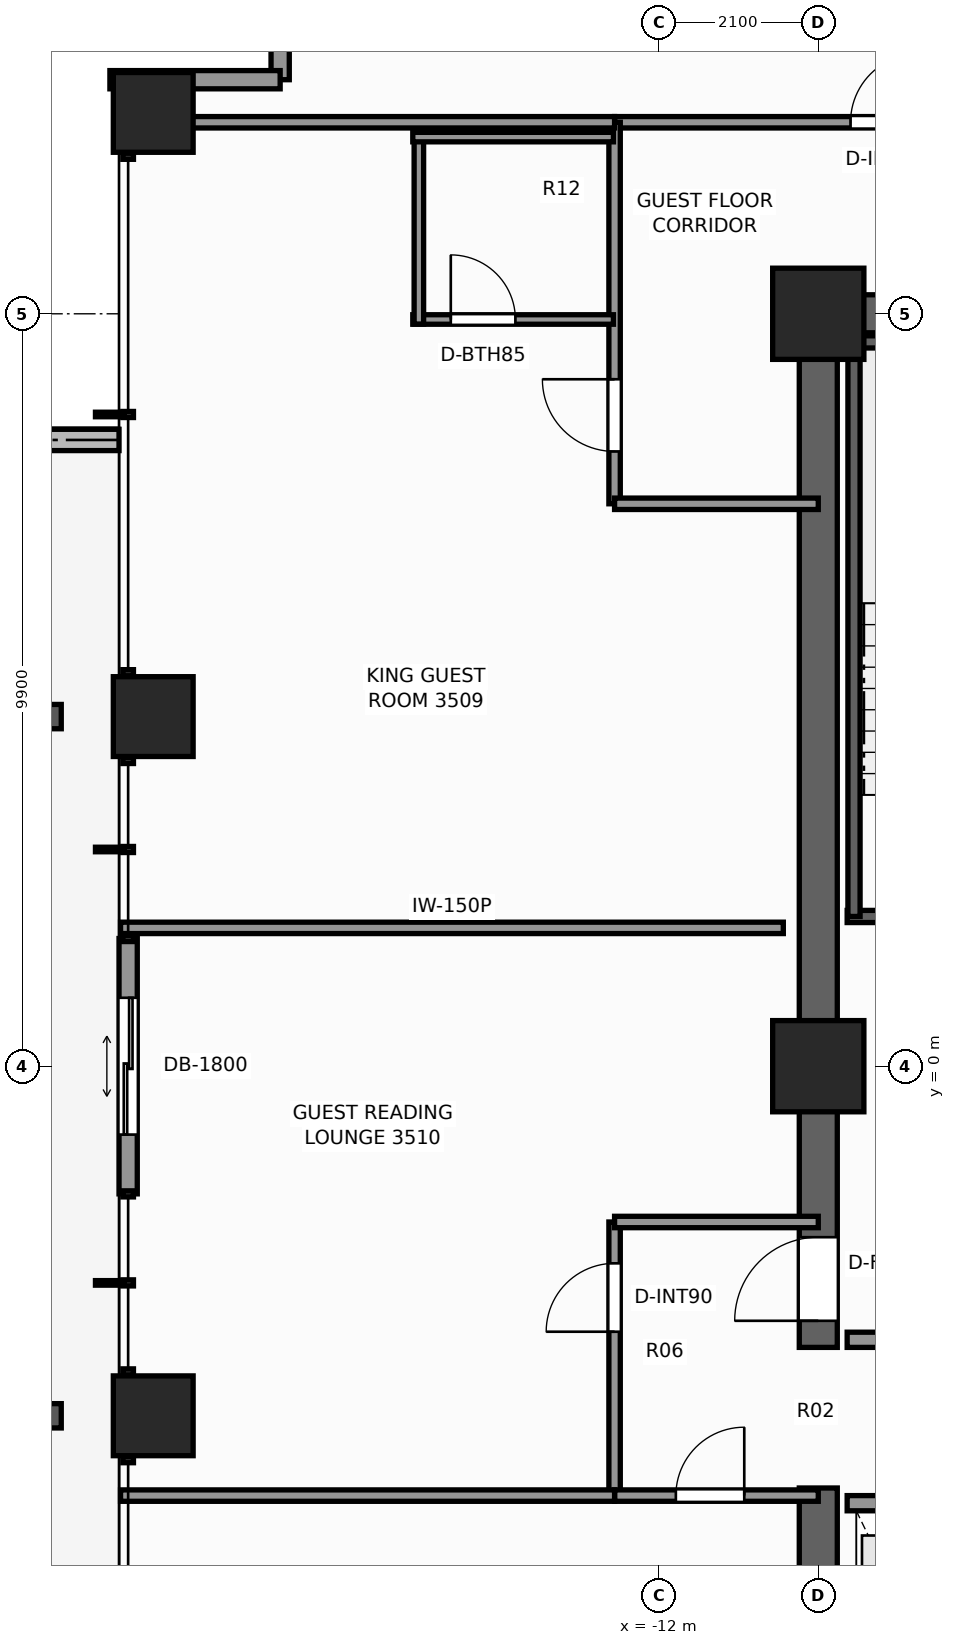
"""IFC4 building model, lengths in metres.
Left out: names, types, materials, properties, quantities, classifications, styles, units other than length and angle.
Written with IfcOpenShell. Run it as: python <this file> out.ifc"""

import sys

from ifc_helpers import new_model, si_unit, direction, frame, frame_2d, origin, origin_2d, place, context, subcontext, project, spatial, rectangle, extrude, element, fill, save


model = new_model("IFC4")
c1 = context("Model", 3, precision=1e-05, world=origin(), true_north=direction((0.0, 1.0)))
c2 = subcontext(c1, "Body", "Model", "MODEL_VIEW")
j1 = project(units=[si_unit("LENGTHUNIT", "METRE"), si_unit("PLANEANGLEUNIT", "RADIAN")], contexts=[c1])
p1 = place(None, origin())
s1 = spatial("IfcSite", under=j1, at=p1, CompositionType="ELEMENT")
p2 = place(p1, origin())
s2 = spatial("IfcBuilding", under=s1, at=p2, CompositionType="ELEMENT")
p3 = place(p2, frame((0.0, 0.0, 121.7)))
s3 = spatial("IfcBuildingStorey", under=s2, at=p3, CompositionType="ELEMENT", Elevation=121.7)
p4 = place(p3, frame((-10.15, 9.9, 0.0), z_axis=(0.0, 0.0, 1.0), x_axis=(1.0, 0.0, 0.0)))
e1 = element("IfcWall", 1, at=p4, inside=s3, PredefinedType="SHEAR", context=c2, shape_type="SweptSolid", body=[
    extrude(rectangle(XDim=14.57, YDim=0.5, at=frame_2d((7.285, 0.0))), origin(), (0.0, 0.0, 1.0), 3.3),
])
p5 = place(p3, frame((-9.9, -9.65, 0.0), z_axis=(0.0, 0.0, 1.0), x_axis=(0.0, 1.0, 0.0)))
e2 = element("IfcWall", 2, at=p5, inside=s3, PredefinedType="SHEAR", context=c2, shape_type="SweptSolid", body=[
    extrude(rectangle(XDim=4.1, YDim=0.5, at=frame_2d((2.05, 0.0))), origin(), (0.0, 0.0, 1.0), 3.3),
])
p6 = place(p3, frame((-9.9, -3.7, 0.0), z_axis=(0.0, 0.0, 1.0), x_axis=(0.0, 1.0, 0.0)))
e3 = element("IfcWall", 3, at=p6, inside=s3, PredefinedType="SHEAR", context=c2, shape_type="SweptSolid", body=[
    extrude(rectangle(XDim=13.35, YDim=0.5, at=frame_2d((6.675, 0.0))), origin(), (0.0, 0.0, 1.0), 3.3),
])
p7 = place(p6, frame((0.35, 0.0, 0.0)))
e4 = element("IfcOpeningElement", 4, at=p7, cuts=e3, PredefinedType="OPENING", context=c2, shape_type="SweptSolid", body=[
    extrude(rectangle(XDim=1.1, YDim=2.2, at=frame_2d((0.55, 1.1))), frame((0.0, 0.26, 0.0), z_axis=(0.0, -1.0, 0.0), x_axis=(1.0, 0.0, 0.0)), (0.0, 0.0, 1.0), 0.52),
])
for number, where, z_axis, x_axis in (
    (5, (-9.9, 9.9, 0.0), (0.0, 0.0, 1.0), (1.0, 0.0, 0.0)),
    (6, (-9.9, 0.0, 0.0), (0.0, 0.0, 1.0), (1.0, 0.0, 0.0)),
):
    element("IfcColumn", number, at=place(p3, frame(where, z_axis=z_axis, x_axis=x_axis)), inside=s3, PredefinedType="COLUMN", context=c2, shape_type="SweptSolid", body=[
        extrude(rectangle(XDim=1.2, YDim=1.2, at=origin_2d()), origin(), (0.0, 0.0, 1.0), 3.3),
    ])
for number, where, z_axis, x_axis in (
    (7, (-18.65, -4.6, 0.0), (0.0, 0.0, 1.0), (1.0, 0.0, 0.0)),
    (8, (-18.65, 4.6, 0.0), (0.0, 0.0, 1.0), (1.0, 0.0, 0.0)),
    (9, (-18.65, 12.55, 0.0), (0.0, 0.0, 1.0), (1.0, 0.0, 0.0)),
):
    element("IfcColumn", number, at=place(p3, frame(where, z_axis=z_axis, x_axis=x_axis)), inside=s3, PredefinedType="COLUMN", context=c2, shape_type="SweptSolid", body=[
        extrude(rectangle(XDim=1.05, YDim=1.05, at=origin_2d()), origin(), (0.0, 0.0, 1.0), 3.3),
    ])
p8 = place(p3, frame((-19.1, 8.24, -0.04), z_axis=(0.0, 0.0, 1.0), x_axis=(-1.0, 0.0, 0.0)))
e10 = element("IfcWall", 10, at=p8, inside=s3, PredefinedType="PARAPET", context=c2, shape_type="SweptSolid", body=[
    extrude(rectangle(XDim=2.006, YDim=0.28, at=frame_2d((1.003, 0.0))), origin(), (0.0, 0.0, 1.0), 0.42),
])
p9 = place(p3, frame((-16.98, 12.98, 0.0), z_axis=(0.0, 0.0, 1.0), x_axis=(0.0, 1.0, 0.0)))
e11 = element("IfcWall", 11, at=p9, inside=s3, PredefinedType="STANDARD", context=c2, shape_type="SweptSolid", body=[
    extrude(rectangle(XDim=2.24, YDim=0.24, at=frame_2d((1.12, 0.0))), origin(), (0.0, 0.0, 1.0), 2.459),
])
p10 = place(p9, frame((0.45, 0.0, 0.65)))
e12 = element("IfcOpeningElement", 12, at=p10, cuts=e11, PredefinedType="OPENING", context=c2, shape_type="SweptSolid", body=[
    extrude(rectangle(XDim=1.1, YDim=1.45, at=frame_2d((0.55, 0.725))), frame((0.0, 0.13, 0.0), z_axis=(0.0, -1.0, 0.0), x_axis=(1.0, 0.0, 0.0)), (0.0, 0.0, 1.0), 0.26),
])
p11 = place(p3, frame((-19.22, 12.98, 0.0), z_axis=(0.0, 0.0, 1.0), x_axis=(1.0, 0.0, 0.0)))
e13 = element("IfcWall", 13, at=p11, inside=s3, PredefinedType="STANDARD", context=c2, shape_type="SweptSolid", body=[
    extrude(rectangle(XDim=2.24, YDim=0.24, at=frame_2d((1.12, 0.0))), origin(), (0.0, 0.0, 1.0), 2.459),
])
p12 = place(p3, frame((-18.98, -1.68, 0.0), z_axis=(0.0, 0.0, 1.0), x_axis=(0.0, 1.0, 0.0)))
e14 = element("IfcWall", 14, at=p12, inside=s3, PredefinedType="STANDARD", context=c2, shape_type="SweptSolid", body=[
    extrude(rectangle(XDim=3.36, YDim=0.24, at=frame_2d((1.68, 0.0))), origin(), (0.0, 0.0, 1.0), 3.08),
])
p13 = place(p12, frame((0.78, 0.0, 0.0)))
e15 = element("IfcOpeningElement", 15, at=p13, cuts=e14, PredefinedType="OPENING", context=c2, shape_type="SweptSolid", body=[
    extrude(rectangle(XDim=1.8, YDim=2.2, at=frame_2d((0.9, 1.1))), frame((0.0, 0.13, 0.0), z_axis=(0.0, -1.0, 0.0), x_axis=(1.0, 0.0, 0.0)), (0.0, 0.0, 1.0), 0.26),
])
p14 = place(p3, frame((-9.52, 1.97, 0.0), z_axis=(0.0, 0.0, 1.0), x_axis=(1.0, 0.0, 0.0)))
e16 = element("IfcWall", 16, at=p14, inside=s3, PredefinedType="SHEAR", context=c2, shape_type="SweptSolid", body=[
    extrude(rectangle(XDim=3.52, YDim=0.16, at=frame_2d((1.76, 0.0))), origin(), (0.0, 0.0, 1.0), 3.3),
])
p15 = place(p14, frame((1.15, 0.0, 0.0)))
e17 = element("IfcOpeningElement", 17, at=p15, cuts=e16, PredefinedType="OPENING", context=c2, shape_type="SweptSolid", body=[
    extrude(rectangle(XDim=1.1, YDim=2.2, at=frame_2d((0.55, 1.1))), frame((0.0, 0.09, 0.0), z_axis=(0.0, -1.0, 0.0), x_axis=(1.0, 0.0, 0.0)), (0.0, 0.0, 1.0), 0.18),
])
p16 = place(p3, frame((-9.52, 9.53, 0.0), z_axis=(0.0, 0.0, 1.0), x_axis=(1.0, 0.0, 0.0)))
e18 = element("IfcWall", 18, at=p16, inside=s3, PredefinedType="SHEAR", context=c2, shape_type="SweptSolid", body=[
    extrude(rectangle(XDim=3.52, YDim=0.16, at=frame_2d((1.76, 0.0))), origin(), (0.0, 0.0, 1.0), 3.3),
])
p17 = place(p3, frame((-9.43, 1.97, 0.0), z_axis=(0.0, 0.0, 1.0), x_axis=(0.0, 1.0, 0.0)))
e19 = element("IfcWall", 19, at=p17, inside=s3, PredefinedType="SHEAR", context=c2, shape_type="SweptSolid", body=[
    extrude(rectangle(XDim=7.56, YDim=0.16, at=frame_2d((3.78, 0.0))), origin(), (0.0, 0.0, 1.0), 3.3),
])
p18 = place(p3, frame((-9.52, -3.6, 0.0), z_axis=(0.0, 0.0, 1.0), x_axis=(1.0, 0.0, 0.0)))
e20 = element("IfcWall", 20, at=p18, inside=s3, PredefinedType="SOLIDWALL", context=c2, shape_type="SweptSolid", body=[
    extrude(rectangle(XDim=3.77, YDim=0.2, at=frame_2d((1.885, 0.0))), origin(), (0.0, 0.0, 1.0), 3.08),
])
p19 = place(p18, frame((1.15, 0.0, 0.0)))
e21 = element("IfcOpeningElement", 21, at=p19, cuts=e20, PredefinedType="OPENING", context=c2, shape_type="SweptSolid", body=[
    extrude(rectangle(XDim=0.95, YDim=2.06, at=frame_2d((0.475, 1.03))), frame((0.0, 0.11, 0.0), z_axis=(0.0, -1.0, 0.0), x_axis=(1.0, 0.0, 0.0)), (0.0, 0.0, 1.0), 0.22),
])
p20 = place(p3, frame((-9.52, -5.75, 0.0), z_axis=(0.0, 0.0, 1.0), x_axis=(1.0, 0.0, 0.0)))
e22 = element("IfcWall", 22, at=p20, inside=s3, PredefinedType="SOLIDWALL", context=c2, shape_type="SweptSolid", body=[
    extrude(rectangle(XDim=5.66, YDim=0.2, at=frame_2d((2.83, 0.0))), origin(), (0.0, 0.0, 1.0), 3.08),
])
p21 = place(p20, frame((0.55, 0.0, 0.0)))
e23 = element("IfcOpeningElement", 23, at=p21, cuts=e22, PredefinedType="OPENING", context=c2, shape_type="SweptSolid", body=[
    extrude(rectangle(XDim=1.1, YDim=2.2, at=frame_2d((0.55, 1.1))), frame((0.0, 0.11, 0.0), z_axis=(0.0, -1.0, 0.0), x_axis=(1.0, 0.0, 0.0)), (0.0, 0.0, 1.0), 0.22),
])
p22 = place(p20, frame((2.48, 0.0, 0.0)))
e24 = element("IfcOpeningElement", 24, at=p22, cuts=e22, PredefinedType="OPENING", context=c2, shape_type="SweptSolid", body=[
    extrude(rectangle(XDim=1.1, YDim=2.2, at=frame_2d((0.55, 1.1))), frame((0.0, 0.11, 0.0), z_axis=(0.0, -1.0, 0.0), x_axis=(1.0, 0.0, 0.0)), (0.0, 0.0, 1.0), 0.22),
])
p23 = place(p20, frame((4.41, 0.0, 0.0)))
e25 = element("IfcOpeningElement", 25, at=p23, cuts=e22, PredefinedType="OPENING", context=c2, shape_type="SweptSolid", body=[
    extrude(rectangle(XDim=1.1, YDim=2.2, at=frame_2d((0.55, 1.1))), frame((0.0, 0.11, 0.0), z_axis=(0.0, -1.0, 0.0), x_axis=(1.0, 0.0, 0.0)), (0.0, 0.0, 1.0), 0.22),
])
p24 = place(p3, frame((-12.58, 12.42, 0.0), z_axis=(0.0, 0.0, 1.0), x_axis=(1.0, 0.0, 0.0)))
e26 = element("IfcWall", 26, at=p24, inside=s3, PredefinedType="PARTITIONING", context=c2, shape_type="SweptSolid", body=[
    extrude(rectangle(XDim=24.84, YDim=0.15, at=frame_2d((12.42, 0.0))), origin(), (0.0, 0.0, 1.0), 2.292),
])
p25 = place(p24, frame((3.104, 0.0, 0.0)))
e27 = element("IfcOpeningElement", 27, at=p25, cuts=e26, PredefinedType="OPENING", context=c2, shape_type="SweptSolid", body=[
    extrude(rectangle(XDim=0.9, YDim=2.06, at=frame_2d((0.45, 1.03))), frame((0.0, 0.085, 0.0), z_axis=(0.0, -1.0, 0.0), x_axis=(1.0, 0.0, 0.0)), (0.0, 0.0, 1.0), 0.17),
])
p26 = place(p24, frame((5.439, 0.0, 0.0)))
e28 = element("IfcOpeningElement", 28, at=p26, cuts=e26, PredefinedType="OPENING", context=c2, shape_type="SweptSolid", body=[
    extrude(rectangle(XDim=0.9, YDim=2.06, at=frame_2d((0.45, 1.03))), frame((0.0, 0.085, 0.0), z_axis=(0.0, -1.0, 0.0), x_axis=(1.0, 0.0, 0.0)), (0.0, 0.0, 1.0), 0.17),
])
p27 = place(p24, frame((10.728, 0.0, 0.0)))
e29 = element("IfcOpeningElement", 29, at=p27, cuts=e26, PredefinedType="OPENING", context=c2, shape_type="SweptSolid", body=[
    extrude(rectangle(XDim=0.9, YDim=2.06, at=frame_2d((0.45, 1.03))), frame((0.0, 0.085, 0.0), z_axis=(0.0, -1.0, 0.0), x_axis=(1.0, 0.0, 0.0)), (0.0, 0.0, 1.0), 0.17),
])
p28 = place(p24, frame((13.906, 0.0, 0.0)))
e30 = element("IfcOpeningElement", 30, at=p28, cuts=e26, PredefinedType="OPENING", context=c2, shape_type="SweptSolid", body=[
    extrude(rectangle(XDim=0.95, YDim=2.06, at=frame_2d((0.475, 1.03))), frame((0.0, 0.085, 0.0), z_axis=(0.0, -1.0, 0.0), x_axis=(1.0, 0.0, 0.0)), (0.0, 0.0, 1.0), 0.17),
])
p29 = place(p24, frame((18.661, 0.0, 0.0)))
e31 = element("IfcOpeningElement", 31, at=p29, cuts=e26, PredefinedType="OPENING", context=c2, shape_type="SweptSolid", body=[
    extrude(rectangle(XDim=0.9, YDim=2.06, at=frame_2d((0.45, 1.03))), frame((0.0, 0.085, 0.0), z_axis=(0.0, -1.0, 0.0), x_axis=(1.0, 0.0, 0.0)), (0.0, 0.0, 1.0), 0.17),
])
p30 = place(p24, frame((20.996, 0.0, 0.0)))
e32 = element("IfcOpeningElement", 32, at=p30, cuts=e26, PredefinedType="OPENING", context=c2, shape_type="SweptSolid", body=[
    extrude(rectangle(XDim=0.9, YDim=2.06, at=frame_2d((0.45, 1.03))), frame((0.0, 0.085, 0.0), z_axis=(0.0, -1.0, 0.0), x_axis=(1.0, 0.0, 0.0)), (0.0, 0.0, 1.0), 0.17),
])
p31 = place(p3, frame((-12.58, 7.4, 0.0), z_axis=(0.0, 0.0, 1.0), x_axis=(0.0, 1.0, 0.0)))
e33 = element("IfcWall", 33, at=p31, inside=s3, PredefinedType="PARTITIONING", context=c2, shape_type="SweptSolid", body=[
    extrude(rectangle(XDim=5.02, YDim=0.15, at=frame_2d((2.51, 0.0))), origin(), (0.0, 0.0, 1.0), 2.292),
])
p32 = place(p31, frame((0.689, 0.0, 0.0)))
e34 = element("IfcOpeningElement", 34, at=p32, cuts=e33, PredefinedType="OPENING", context=c2, shape_type="SweptSolid", body=[
    extrude(rectangle(XDim=0.95, YDim=2.06, at=frame_2d((0.475, 1.03))), frame((0.0, 0.085, 0.0), z_axis=(0.0, -1.0, 0.0), x_axis=(1.0, 0.0, 0.0)), (0.0, 0.0, 1.0), 0.17),
])
p33 = place(p3, frame((-12.58, 7.4, 0.0), z_axis=(0.0, 0.0, 1.0), x_axis=(1.0, 0.0, 0.0)))
e35 = element("IfcWall", 35, at=p33, inside=s3, PredefinedType="PARTITIONING", context=c2, shape_type="SweptSolid", body=[
    extrude(rectangle(XDim=2.68, YDim=0.15, at=frame_2d((1.34, 0.0))), origin(), (0.0, 0.0, 1.0), 3.08),
])
p34 = place(p3, frame((-12.58, -5.65, 0.0), z_axis=(0.0, 0.0, 1.0), x_axis=(0.0, 1.0, 0.0)))
e36 = element("IfcWall", 36, at=p34, inside=s3, PredefinedType="PARTITIONING", context=c2, shape_type="SweptSolid", body=[
    extrude(rectangle(XDim=3.6, YDim=0.15, at=frame_2d((1.8, 0.0))), origin(), (0.0, 0.0, 1.0), 2.292),
])
p35 = place(p34, frame((2.156, 0.0, 0.0)))
e37 = element("IfcOpeningElement", 37, at=p35, cuts=e36, PredefinedType="OPENING", context=c2, shape_type="SweptSolid", body=[
    extrude(rectangle(XDim=0.9, YDim=2.06, at=frame_2d((0.45, 1.03))), frame((0.0, 0.085, 0.0), z_axis=(0.0, -1.0, 0.0), x_axis=(1.0, 0.0, 0.0)), (0.0, 0.0, 1.0), 0.17),
])
p36 = place(p3, frame((-12.58, -2.05, 0.0), z_axis=(0.0, 0.0, 1.0), x_axis=(1.0, 0.0, 0.0)))
e38 = element("IfcWall", 38, at=p36, inside=s3, PredefinedType="PARTITIONING", context=c2, shape_type="SweptSolid", body=[
    extrude(rectangle(XDim=2.68, YDim=0.15, at=frame_2d((1.34, 0.0))), origin(), (0.0, 0.0, 1.0), 3.08),
])
p37 = place(p3, frame((-12.58, -5.65, 0.0), z_axis=(0.0, 0.0, 1.0), x_axis=(1.0, 0.0, 0.0)))
e39 = element("IfcWall", 39, at=p37, inside=s3, PredefinedType="PARTITIONING", context=c2, shape_type="SweptSolid", body=[
    extrude(rectangle(XDim=2.68, YDim=0.15, at=frame_2d((1.34, 0.0))), origin(), (0.0, 0.0, 1.0), 3.08),
])
p38 = place(p37, frame((0.806, 0.0, 0.0)))
e40 = element("IfcOpeningElement", 40, at=p38, cuts=e39, PredefinedType="OPENING", context=c2, shape_type="SweptSolid", body=[
    extrude(rectangle(XDim=0.9, YDim=2.06, at=frame_2d((0.45, 1.03))), frame((0.0, 0.085, 0.0), z_axis=(0.0, -1.0, 0.0), x_axis=(1.0, 0.0, 0.0)), (0.0, 0.0, 1.0), 0.17),
])
p39 = place(p3, frame((-19.08, 12.42, 0.0), z_axis=(0.0, 0.0, 1.0), x_axis=(1.0, 0.0, 0.0)))
e41 = element("IfcWall", 41, at=p39, inside=s3, PredefinedType="PARTITIONING", context=c2, shape_type="SweptSolid", body=[
    extrude(rectangle(XDim=6.5, YDim=0.15, at=frame_2d((3.25, 0.0))), origin(), (0.0, 0.0, 1.0), 2.292),
])
p40 = place(p3, frame((-19.08, 1.82, 0.0), z_axis=(0.0, 0.0, 1.0), x_axis=(1.0, 0.0, 0.0)))
e42 = element("IfcWall", 42, at=p40, inside=s3, PredefinedType="PARTITIONING", context=c2, shape_type="SweptSolid", body=[
    extrude(rectangle(XDim=8.72, YDim=0.15, at=frame_2d((4.36, 0.0))), origin(), (0.0, 0.0, 1.0), 2.449),
])
p41 = place(p3, frame((-19.08, -5.65, 0.0), z_axis=(0.0, 0.0, 1.0), x_axis=(1.0, 0.0, 0.0)))
e43 = element("IfcWall", 43, at=p41, inside=s3, PredefinedType="PARTITIONING", context=c2, shape_type="SweptSolid", body=[
    extrude(rectangle(XDim=6.5, YDim=0.15, at=frame_2d((3.25, 0.0))), origin(), (0.0, 0.0, 1.0), 2.449),
])
p42 = place(p3, frame((-15.235, 9.825, 0.0), z_axis=(0.0, 0.0, 1.0), x_axis=(1.0, 0.0, 0.0)))
e44 = element("IfcWall", 44, at=p42, inside=s3, PredefinedType="PARTITIONING", context=c2, shape_type="SweptSolid", body=[
    extrude(rectangle(XDim=2.64, YDim=0.125, at=frame_2d((1.32, 0.0))), origin(), (0.0, 0.0, 1.0), 3.08),
])
p43 = place(p42, frame((0.5, 0.0, 0.0)))
e45 = element("IfcOpeningElement", 45, at=p43, cuts=e44, PredefinedType="OPENING", context=c2, shape_type="SweptSolid", body=[
    extrude(rectangle(XDim=0.85, YDim=2.03, at=frame_2d((0.425, 1.015))), frame((0.0, 0.073, 0.0), z_axis=(0.0, -1.0, 0.0), x_axis=(1.0, 0.0, 0.0)), (0.0, 0.0, 1.0), 0.145),
])
p44 = place(p3, frame((-15.155, 9.765, 0.0), z_axis=(0.0, 0.0, 1.0), x_axis=(0.0, 1.0, 0.0)))
e46 = element("IfcWall", 46, at=p44, inside=s3, PredefinedType="PARTITIONING", context=c2, shape_type="SweptSolid", body=[
    extrude(rectangle(XDim=2.52, YDim=0.125, at=frame_2d((1.26, 0.0))), origin(), (0.0, 0.0, 1.0), 2.292),
])
p45 = place(p3, frame((-15.235, 12.225, 0.0), z_axis=(0.0, 0.0, 1.0), x_axis=(1.0, 0.0, 0.0)))
e47 = element("IfcWall", 47, at=p45, inside=s3, PredefinedType="PARTITIONING", context=c2, shape_type="SweptSolid", body=[
    extrude(rectangle(XDim=2.64, YDim=0.125, at=frame_2d((1.32, 0.0))), origin(), (0.0, 0.0, 1.0), 3.08),
])
p46 = place(p13, origin())
e48 = element("IfcDoor", 48, at=p46, inside=s3, OperationType="DOUBLE_DOOR_SLIDING", PredefinedType="DOOR", context=c2, shape_type="SweptSolid", body=[
    extrude(rectangle(XDim=1.8, YDim=2.2, at=frame_2d((0.9, 1.1))), frame((0.0, 0.025, 0.0), z_axis=(0.0, -1.0, 0.0), x_axis=(1.0, 0.0, 0.0)), (0.0, 0.0, 1.0), 0.05),
])
fill(e15, e48)
p47 = place(p7, origin())
e49 = element("IfcDoor", 49, at=p47, inside=s3, OperationType="SINGLE_SWING_LEFT", PredefinedType="DOOR", context=c2, shape_type="SweptSolid", body=[
    extrude(rectangle(XDim=1.1, YDim=2.2, at=frame_2d((0.55, 1.1))), frame((0.0, 0.025, 0.0), z_axis=(0.0, -1.0, 0.0), x_axis=(1.0, 0.0, 0.0)), (0.0, 0.0, 1.0), 0.05),
])
fill(e4, e49)
p48 = place(p25, origin())
e50 = element("IfcDoor", 50, at=p48, inside=s3, OperationType="SINGLE_SWING_RIGHT", PredefinedType="DOOR", context=c2, shape_type="SweptSolid", body=[
    extrude(rectangle(XDim=0.9, YDim=2.06, at=frame_2d((0.45, 1.03))), frame((0.0, 0.025, 0.0), z_axis=(0.0, -1.0, 0.0), x_axis=(1.0, 0.0, 0.0)), (0.0, 0.0, 1.0), 0.05),
])
fill(e27, e50)
p49 = place(p43, origin())
e51 = element("IfcDoor", 51, at=p49, inside=s3, OperationType="SINGLE_SWING_LEFT", PredefinedType="DOOR", context=c2, shape_type="SweptSolid", body=[
    extrude(rectangle(XDim=0.85, YDim=2.03, at=frame_2d((0.425, 1.015))), frame((0.0, 0.025, 0.0), z_axis=(0.0, -1.0, 0.0), x_axis=(1.0, 0.0, 0.0)), (0.0, 0.0, 1.0), 0.05),
])
fill(e45, e51)
p50 = place(p32, origin())
e52 = element("IfcDoor", 52, at=p50, inside=s3, OperationType="SINGLE_SWING_RIGHT", PredefinedType="DOOR", context=c2, shape_type="SweptSolid", body=[
    extrude(rectangle(XDim=0.95, YDim=2.06, at=frame_2d((0.475, 1.03))), frame((0.0, 0.025, 0.0), z_axis=(0.0, -1.0, 0.0), x_axis=(1.0, 0.0, 0.0)), (0.0, 0.0, 1.0), 0.05),
])
fill(e34, e52)
p51 = place(p35, origin())
e53 = element("IfcDoor", 53, at=p51, inside=s3, OperationType="SINGLE_SWING_LEFT", PredefinedType="DOOR", context=c2, shape_type="SweptSolid", body=[
    extrude(rectangle(XDim=0.9, YDim=2.06, at=frame_2d((0.45, 1.03))), frame((0.0, 0.025, 0.0), z_axis=(0.0, -1.0, 0.0), x_axis=(1.0, 0.0, 0.0)), (0.0, 0.0, 1.0), 0.05),
])
fill(e37, e53)
p52 = place(p38, origin())
e54 = element("IfcDoor", 54, at=p52, inside=s3, OperationType="SINGLE_SWING_RIGHT", PredefinedType="DOOR", context=c2, shape_type="SweptSolid", body=[
    extrude(rectangle(XDim=0.9, YDim=2.06, at=frame_2d((0.45, 1.03))), frame((0.0, 0.025, 0.0), z_axis=(0.0, -1.0, 0.0), x_axis=(1.0, 0.0, 0.0)), (0.0, 0.0, 1.0), 0.05),
])
fill(e40, e54)
save(model, sys.argv[1])
